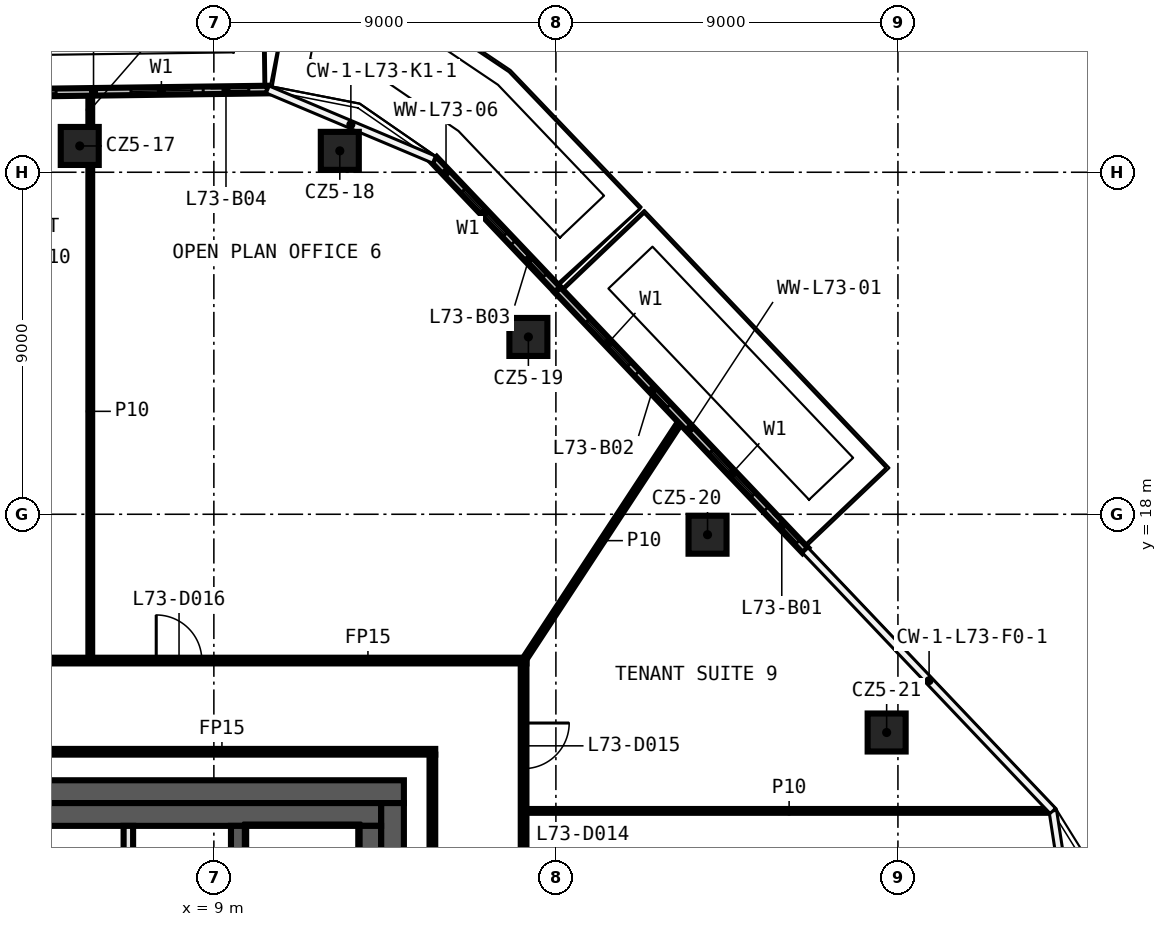
"""IFC4 building model, lengths in metres.
Left out: names, types, materials, properties, quantities, classifications, styles, units other than length and angle.
Written with IfcOpenShell. Run it as: python <this file> out.ifc"""

import sys

from ifc_helpers import new_model, si_unit, direction, frame, frame_2d, origin, origin_2d, place, context, subcontext, project, spatial, rectangle, extrude, element, fill, save


model = new_model("IFC4")
c1 = context("Model", 3, precision=1e-05, world=origin(), true_north=direction((0.0, 1.0)))
c2 = subcontext(c1, "Body", "Model", "MODEL_VIEW")
j1 = project(units=[si_unit("LENGTHUNIT", "METRE"), si_unit("PLANEANGLEUNIT", "RADIAN")], contexts=[c1])
p1 = place(None, origin())
s1 = spatial("IfcSite", under=j1, at=p1, CompositionType="ELEMENT")
p2 = place(p1, origin())
s2 = spatial("IfcBuilding", under=s1, at=p2, CompositionType="ELEMENT")
p3 = place(p2, frame((0.0, 0.0, 340.4)))
s3 = spatial("IfcBuildingStorey", under=s2, at=p3, CompositionType="ELEMENT", Elevation=340.4)
for number, where, z_axis, x_axis in (
    (1, (5.471, 27.692, 0.0), (0.0, 0.0, 1.0), (1.0, 0.0, 0.0)),
    (2, (12.314, 27.563, 0.0), (0.0, 0.0, 1.0), (1.0, 0.0, 0.0)),
    (3, (17.276, 22.666, 0.0), (0.0, 0.0, 1.0), (1.0, 0.0, 0.0)),
    (4, (21.99, 17.462, 0.0), (0.0, 0.0, 1.0), (1.0, 0.0, 0.0)),
    (5, (26.703, 12.257, 0.0), (0.0, 0.0, 1.0), (1.0, 0.0, 0.0)),
):
    element("IfcColumn", number, at=place(p3, frame(where, z_axis=z_axis, x_axis=x_axis)), inside=s3, PredefinedType="COLUMN", context=c2, shape_type="SweptSolid", body=[
        extrude(rectangle(XDim=1.0, YDim=1.0, at=origin_2d()), origin(), (0.0, 0.0, 1.0), 3.82),
    ])
p4 = place(p3, frame((17.225, 10.194, 0.0), z_axis=(0.0, 0.0, 1.0), x_axis=(1.0, 0.0, 0.0)))
e6 = element("IfcWall", 6, at=p4, inside=s3, PredefinedType="PARTITIONING", context=c2, shape_type="SweptSolid", body=[
    extrude(rectangle(XDim=13.823, YDim=0.1, at=frame_2d((6.912, 0.0))), origin(), (0.0, 0.0, 1.0), 3.82),
])
p5 = place(p3, frame((3.6, 11.75, 0.0), z_axis=(0.0, 0.0, 1.0), x_axis=(1.0, 0.0, 0.0)))
e7 = element("IfcWall", 7, at=p5, inside=s3, PredefinedType="PARTITIONING", context=c2, shape_type="SweptSolid", body=[
    extrude(rectangle(XDim=11.225, YDim=0.15, at=frame_2d((5.612, 0.0))), origin(), (0.0, 0.0, 1.0), 3.82),
])
p6 = place(p3, frame((-17.225, 14.15, 0.0), z_axis=(0.0, 0.0, 1.0), x_axis=(1.0, 0.0, 0.0)))
e8 = element("IfcWall", 8, at=p6, inside=s3, PredefinedType="PARTITIONING", context=c2, shape_type="SweptSolid", body=[
    extrude(rectangle(XDim=34.45, YDim=0.15, at=frame_2d((17.225, 0.0))), origin(), (0.0, 0.0, 1.0), 3.82),
])
p7 = place(p6, frame((24.708, 0.0, 0.0)))
e9 = element("IfcOpeningElement", 9, at=p7, cuts=e8, PredefinedType="OPENING", context=c2, shape_type="SweptSolid", body=[
    extrude(rectangle(XDim=1.2, YDim=2.1, at=frame_2d((0.6, 1.05))), frame((0.0, 0.085, 0.0), z_axis=(0.0, -1.0, 0.0), x_axis=(1.0, 0.0, 0.0)), (0.0, 0.0, 1.0), 0.17),
])
p8 = place(p6, frame((20.038, 0.0, 0.0)))
e10 = element("IfcOpeningElement", 10, at=p8, cuts=e8, PredefinedType="OPENING", context=c2, shape_type="SweptSolid", body=[
    extrude(rectangle(XDim=1.2, YDim=2.1, at=frame_2d((0.6, 1.05))), frame((0.0, 0.085, 0.0), z_axis=(0.0, -1.0, 0.0), x_axis=(1.0, 0.0, 0.0)), (0.0, 0.0, 1.0), 0.17),
])
p9 = place(p6, frame((15.367, 0.0, 0.0)))
e11 = element("IfcOpeningElement", 11, at=p9, cuts=e8, PredefinedType="OPENING", context=c2, shape_type="SweptSolid", body=[
    extrude(rectangle(XDim=1.2, YDim=2.1, at=frame_2d((0.6, 1.05))), frame((0.0, 0.085, 0.0), z_axis=(0.0, -1.0, 0.0), x_axis=(1.0, 0.0, 0.0)), (0.0, 0.0, 1.0), 0.17),
])
p10 = place(p6, frame((10.695, 0.0, 0.0)))
e12 = element("IfcOpeningElement", 12, at=p10, cuts=e8, PredefinedType="OPENING", context=c2, shape_type="SweptSolid", body=[
    extrude(rectangle(XDim=1.2, YDim=2.1, at=frame_2d((0.6, 1.05))), frame((0.0, 0.085, 0.0), z_axis=(0.0, -1.0, 0.0), x_axis=(1.0, 0.0, 0.0)), (0.0, 0.0, 1.0), 0.17),
])
p11 = place(p6, frame((6.025, 0.0, 0.0)))
e13 = element("IfcOpeningElement", 13, at=p11, cuts=e8, PredefinedType="OPENING", context=c2, shape_type="SweptSolid", body=[
    extrude(rectangle(XDim=1.2, YDim=2.1, at=frame_2d((0.6, 1.05))), frame((0.0, 0.085, 0.0), z_axis=(0.0, -1.0, 0.0), x_axis=(1.0, 0.0, 0.0)), (0.0, 0.0, 1.0), 0.17),
])
p12 = place(p6, frame((1.698, 0.0, 0.0)))
e14 = element("IfcOpeningElement", 14, at=p12, cuts=e8, PredefinedType="OPENING", context=c2, shape_type="SweptSolid", body=[
    extrude(rectangle(XDim=1.2, YDim=2.1, at=frame_2d((0.6, 1.05))), frame((0.0, 0.085, 0.0), z_axis=(0.0, -1.0, 0.0), x_axis=(1.0, 0.0, 0.0)), (0.0, 0.0, 1.0), 0.17),
])
p13 = place(p3, frame((17.15, 14.15, 0.0), z_axis=(0.0, 0.0, 1.0), x_axis=(0.548731307267, 0.835998775373, 0.0)))
e15 = element("IfcWall", 15, at=p13, inside=s3, PredefinedType="PARTITIONING", context=c2, shape_type="SweptSolid", body=[
    extrude(rectangle(XDim=7.55, YDim=0.1, at=frame_2d((3.775, 0.0))), origin(), (0.0, 0.0, 1.0), 3.82),
])
p14 = place(p3, frame((17.15, 14.075, 0.0), z_axis=(0.0, 0.0, 1.0), x_axis=(0.0, -1.0, 0.0)))
e16 = element("IfcWall", 16, at=p14, inside=s3, PredefinedType="PARTITIONING", context=c2, shape_type="SweptSolid", body=[
    extrude(rectangle(XDim=28.15, YDim=0.15, at=frame_2d((14.075, 0.0))), origin(), (0.0, 0.0, 1.0), 3.82),
])
p15 = place(p14, frame((24.339, 0.0, 0.0)))
e17 = element("IfcOpeningElement", 17, at=p15, cuts=e16, PredefinedType="OPENING", context=c2, shape_type="SweptSolid", body=[
    extrude(rectangle(XDim=1.2, YDim=2.1, at=frame_2d((0.6, 1.05))), frame((0.0, 0.085, 0.0), z_axis=(0.0, -1.0, 0.0), x_axis=(1.0, 0.0, 0.0)), (0.0, 0.0, 1.0), 0.17),
])
p16 = place(p14, frame((20.227, 0.0, 0.0)))
e18 = element("IfcOpeningElement", 18, at=p16, cuts=e16, PredefinedType="OPENING", context=c2, shape_type="SweptSolid", body=[
    extrude(rectangle(XDim=1.2, YDim=2.1, at=frame_2d((0.6, 1.05))), frame((0.0, 0.085, 0.0), z_axis=(0.0, -1.0, 0.0), x_axis=(1.0, 0.0, 0.0)), (0.0, 0.0, 1.0), 0.17),
])
p17 = place(p14, frame((16.115, 0.0, 0.0)))
e19 = element("IfcOpeningElement", 19, at=p17, cuts=e16, PredefinedType="OPENING", context=c2, shape_type="SweptSolid", body=[
    extrude(rectangle(XDim=1.2, YDim=2.1, at=frame_2d((0.6, 1.05))), frame((0.0, 0.085, 0.0), z_axis=(0.0, -1.0, 0.0), x_axis=(1.0, 0.0, 0.0)), (0.0, 0.0, 1.0), 0.17),
])
p18 = place(p14, frame((12.006, 0.0, 0.0)))
e20 = element("IfcOpeningElement", 20, at=p18, cuts=e16, PredefinedType="OPENING", context=c2, shape_type="SweptSolid", body=[
    extrude(rectangle(XDim=1.2, YDim=2.1, at=frame_2d((0.6, 1.05))), frame((0.0, 0.085, 0.0), z_axis=(0.0, -1.0, 0.0), x_axis=(1.0, 0.0, 0.0)), (0.0, 0.0, 1.0), 0.17),
])
p19 = place(p14, frame((5.464, 0.0, 0.0)))
e21 = element("IfcOpeningElement", 21, at=p19, cuts=e16, PredefinedType="OPENING", context=c2, shape_type="SweptSolid", body=[
    extrude(rectangle(XDim=1.2, YDim=2.1, at=frame_2d((0.6, 1.05))), frame((0.0, 0.085, 0.0), z_axis=(0.0, -1.0, 0.0), x_axis=(1.0, 0.0, 0.0)), (0.0, 0.0, 1.0), 0.17),
])
p20 = place(p14, frame((1.569, 0.0, 0.0)))
e22 = element("IfcOpeningElement", 22, at=p20, cuts=e16, PredefinedType="OPENING", context=c2, shape_type="SweptSolid", body=[
    extrude(rectangle(XDim=1.2, YDim=2.1, at=frame_2d((0.6, 1.05))), frame((0.0, 0.085, 0.0), z_axis=(0.0, -1.0, 0.0), x_axis=(1.0, 0.0, 0.0)), (0.0, 0.0, 1.0), 0.17),
])
p21 = place(p3, frame((14.75, -11.675, 0.0), z_axis=(0.0, 0.0, 1.0), x_axis=(0.0, 1.0, 0.0)))
e23 = element("IfcWall", 23, at=p21, inside=s3, PredefinedType="PARTITIONING", context=c2, shape_type="SweptSolid", body=[
    extrude(rectangle(XDim=23.35, YDim=0.15, at=frame_2d((11.675, 0.0))), origin(), (0.0, 0.0, 1.0), 3.82),
])
p22 = place(p3, frame((5.748, 14.225, 0.0), z_axis=(0.0, 0.0, 1.0), x_axis=(0.0, 1.0, 0.0)))
e24 = element("IfcWall", 24, at=p22, inside=s3, PredefinedType="PARTITIONING", context=c2, shape_type="SweptSolid", body=[
    extrude(rectangle(XDim=12.967, YDim=0.1, at=frame_2d((6.483, 0.0))), origin(), (0.0, 0.0, 1.0), 3.82),
])
p23 = place(p3, frame((5.748, 28.192, 0.0), z_axis=(0.0, 0.0, 1.0), x_axis=(0.0, 1.0, 0.0)))
e25 = element("IfcWall", 25, at=p23, inside=s3, PredefinedType="PARTITIONING", context=c2, shape_type="SweptSolid", body=[
    extrude(rectangle(XDim=0.903, YDim=0.1, at=frame_2d((0.452, 0.0))), origin(), (0.0, 0.0, 1.0), 3.82),
])
p24 = place(p3, frame((24.563, 17.049, 0.0), z_axis=(0.0, 0.0, 1.0), x_axis=(-0.688807081371, 0.724944690755, 0.0)))
e26 = element("IfcWall", 26, at=p24, inside=s3, PredefinedType="SOLIDWALL", context=c2, shape_type="SweptSolid", body=[
    extrude(rectangle(XDim=9.465, YDim=0.2, at=frame_2d((4.732, 0.0))), origin(), (0.0, 0.0, 1.0), 3.82),
])
p25 = place(p24, frame((2.0, 0.0, 0.6)))
e27 = element("IfcOpeningElement", 27, at=p25, cuts=e26, PredefinedType="OPENING", context=c2, shape_type="SweptSolid", body=[
    extrude(rectangle(XDim=1.6, YDim=2.4, at=frame_2d((0.8, 1.2))), frame((0.0, 0.11, 0.0), z_axis=(0.0, -1.0, 0.0), x_axis=(1.0, 0.0, 0.0)), (0.0, 0.0, 1.0), 0.22),
])
p26 = place(p24, frame((0.3, 0.0, 0.0)))
e28 = element("IfcOpeningElement", 28, at=p26, cuts=e26, PredefinedType="OPENING", context=c2, shape_type="SweptSolid", body=[
    extrude(rectangle(XDim=1.2, YDim=2.4, at=frame_2d((0.6, 1.2))), frame((0.0, 0.11, 0.0), z_axis=(0.0, -1.0, 0.0), x_axis=(1.0, 0.0, 0.0)), (0.0, 0.0, 1.0), 0.22),
])
p27 = place(p24, frame((6.733, 0.0, 0.6)))
e29 = element("IfcOpeningElement", 29, at=p27, cuts=e26, PredefinedType="OPENING", context=c2, shape_type="SweptSolid", body=[
    extrude(rectangle(XDim=1.6, YDim=2.4, at=frame_2d((0.8, 1.2))), frame((0.0, 0.11, 0.0), z_axis=(0.0, -1.0, 0.0), x_axis=(1.0, 0.0, 0.0)), (0.0, 0.0, 1.0), 0.22),
])
p28 = place(p24, frame((5.233, 0.0, 0.0)))
e30 = element("IfcOpeningElement", 30, at=p28, cuts=e26, PredefinedType="OPENING", context=c2, shape_type="SweptSolid", body=[
    extrude(rectangle(XDim=1.2, YDim=2.4, at=frame_2d((0.6, 1.2))), frame((0.0, 0.11, 0.0), z_axis=(0.0, -1.0, 0.0), x_axis=(1.0, 0.0, 0.0)), (0.0, 0.0, 1.0), 0.22),
])
p29 = place(p3, frame((18.044, 23.91, 0.0), z_axis=(0.0, 0.0, 1.0), x_axis=(-0.688806527413, 0.724945217098, 0.0)))
e31 = element("IfcWall", 31, at=p29, inside=s3, PredefinedType="SOLIDWALL", context=c2, shape_type="SweptSolid", body=[
    extrude(rectangle(XDim=4.722, YDim=0.2, at=frame_2d((2.361, 0.0))), origin(), (0.0, 0.0, 1.0), 3.82),
])
p30 = place(p29, frame((2.0, 0.0, 0.6)))
e32 = element("IfcOpeningElement", 32, at=p30, cuts=e31, PredefinedType="OPENING", context=c2, shape_type="SweptSolid", body=[
    extrude(rectangle(XDim=1.6, YDim=2.4, at=frame_2d((0.8, 1.2))), frame((0.0, 0.11, 0.0), z_axis=(0.0, -1.0, 0.0), x_axis=(1.0, 0.0, 0.0)), (0.0, 0.0, 1.0), 0.22),
])
p31 = place(p29, frame((0.5, 0.0, 0.0)))
e33 = element("IfcOpeningElement", 33, at=p31, cuts=e31, PredefinedType="OPENING", context=c2, shape_type="SweptSolid", body=[
    extrude(rectangle(XDim=1.2, YDim=2.4, at=frame_2d((0.6, 1.2))), frame((0.0, 0.11, 0.0), z_axis=(0.0, -1.0, 0.0), x_axis=(1.0, 0.0, 0.0)), (0.0, 0.0, 1.0), 0.22),
])
p32 = place(p3, frame((10.419, 29.177, 0.0), z_axis=(0.0, 0.0, 1.0), x_axis=(-0.999913262087, -0.013170736582, 0.0)))
e34 = element("IfcWall", 34, at=p32, inside=s3, PredefinedType="SOLIDWALL", context=c2, shape_type="SweptSolid", body=[
    extrude(rectangle(XDim=14.014, YDim=0.2, at=frame_2d((7.007, 0.0))), origin(), (0.0, 0.0, 1.0), 3.82),
])
p33 = place(p32, frame((2.0, 0.0, 0.6)))
e35 = element("IfcOpeningElement", 35, at=p33, cuts=e34, PredefinedType="OPENING", context=c2, shape_type="SweptSolid", body=[
    extrude(rectangle(XDim=1.6, YDim=2.4, at=frame_2d((0.8, 1.2))), frame((0.0, 0.11, 0.0), z_axis=(0.0, -1.0, 0.0), x_axis=(1.0, 0.0, 0.0)), (0.0, 0.0, 1.0), 0.22),
])
p34 = place(p32, frame((0.5, 0.0, 0.0)))
e36 = element("IfcOpeningElement", 36, at=p34, cuts=e34, PredefinedType="OPENING", context=c2, shape_type="SweptSolid", body=[
    extrude(rectangle(XDim=1.2, YDim=2.4, at=frame_2d((0.6, 1.2))), frame((0.0, 0.11, 0.0), z_axis=(0.0, -1.0, 0.0), x_axis=(1.0, 0.0, 0.0)), (0.0, 0.0, 1.0), 0.22),
])
p35 = place(p32, frame((7.071, 0.0, 0.6)))
e37 = element("IfcOpeningElement", 37, at=p35, cuts=e34, PredefinedType="OPENING", context=c2, shape_type="SweptSolid", body=[
    extrude(rectangle(XDim=1.6, YDim=2.4, at=frame_2d((0.8, 1.2))), frame((0.0, 0.11, 0.0), z_axis=(0.0, -1.0, 0.0), x_axis=(1.0, 0.0, 0.0)), (0.0, 0.0, 1.0), 0.22),
])
p36 = place(p32, frame((5.571, 0.0, 0.0)))
e38 = element("IfcOpeningElement", 38, at=p36, cuts=e34, PredefinedType="OPENING", context=c2, shape_type="SweptSolid", body=[
    extrude(rectangle(XDim=1.2, YDim=2.4, at=frame_2d((0.6, 1.2))), frame((0.0, 0.11, 0.0), z_axis=(0.0, -1.0, 0.0), x_axis=(1.0, 0.0, 0.0)), (0.0, 0.0, 1.0), 0.22),
])
p37 = place(p32, frame((11.342, 0.0, 0.6)))
e39 = element("IfcOpeningElement", 39, at=p37, cuts=e34, PredefinedType="OPENING", context=c2, shape_type="SweptSolid", body=[
    extrude(rectangle(XDim=1.6, YDim=2.4, at=frame_2d((0.8, 1.2))), frame((0.0, 0.11, 0.0), z_axis=(0.0, -1.0, 0.0), x_axis=(1.0, 0.0, 0.0)), (0.0, 0.0, 1.0), 0.22),
])
p38 = place(p32, frame((9.842, 0.0, 0.0)))
e40 = element("IfcOpeningElement", 40, at=p38, cuts=e34, PredefinedType="OPENING", context=c2, shape_type="SweptSolid", body=[
    extrude(rectangle(XDim=1.2, YDim=2.4, at=frame_2d((0.6, 1.2))), frame((0.0, 0.11, 0.0), z_axis=(0.0, -1.0, 0.0), x_axis=(1.0, 0.0, 0.0)), (0.0, 0.0, 1.0), 0.22),
])
p39 = place(p3, frame((-14.0, 10.7, 0.0), z_axis=(0.0, 0.0, 1.0), x_axis=(1.0, 0.0, 0.0)))
e41 = element("IfcWall", 41, at=p39, inside=s3, PredefinedType="SHEAR", context=c2, shape_type="SweptSolid", body=[
    extrude(rectangle(XDim=28.0, YDim=0.6, at=frame_2d((14.0, 0.0))), origin(), (0.0, 0.0, 1.0), 3.82),
])
p40 = place(p39, frame((15.9, 0.0, 0.0)))
e42 = element("IfcOpeningElement", 42, at=p40, cuts=e41, PredefinedType="OPENING", context=c2, shape_type="SweptSolid", body=[
    extrude(rectangle(XDim=1.6, YDim=2.1, at=frame_2d((0.8, 1.05))), frame((0.0, 0.31, 0.0), z_axis=(0.0, -1.0, 0.0), x_axis=(1.0, 0.0, 0.0)), (0.0, 0.0, 1.0), 0.62),
])
p41 = place(p3, frame((13.7, 10.4, 0.0), z_axis=(0.0, 0.0, 1.0), x_axis=(0.0, -1.0, 0.0)))
e43 = element("IfcWall", 43, at=p41, inside=s3, PredefinedType="SHEAR", context=c2, shape_type="SweptSolid", body=[
    extrude(rectangle(XDim=20.8, YDim=0.6, at=frame_2d((10.4, 0.0))), origin(), (0.0, 0.0, 1.0), 3.82),
])
p42 = place(p3, frame((3.9, 10.1, 0.0), z_axis=(0.0, 0.0, 1.0), x_axis=(1.0, 0.0, 0.0)))
e44 = element("IfcWall", 44, at=p42, inside=s3, PredefinedType="SHEAR", context=c2, shape_type="SweptSolid", body=[
    extrude(rectangle(XDim=9.5, YDim=0.6, at=frame_2d((4.75, 0.0))), origin(), (0.0, 0.0, 1.0), 3.82),
])
p43 = place(p3, frame((13.1, 9.8, 0.0), z_axis=(0.0, 0.0, 1.0), x_axis=(0.0, -1.0, 0.0)))
e45 = element("IfcWall", 45, at=p43, inside=s3, PredefinedType="SHEAR", context=c2, shape_type="SweptSolid", body=[
    extrude(rectangle(XDim=19.6, YDim=0.6, at=frame_2d((9.8, 0.0))), origin(), (0.0, 0.0, 1.0), 3.82),
])
p44 = place(p3, frame((9.65, 9.8, 0.0), z_axis=(0.0, 0.0, 1.0), x_axis=(0.0, -1.0, 0.0)))
e46 = element("IfcWall", 46, at=p44, inside=s3, PredefinedType="SHEAR", context=c2, shape_type="SweptSolid", body=[
    extrude(rectangle(XDim=7.5, YDim=0.4, at=frame_2d((3.75, 0.0))), origin(), (0.0, 0.0, 1.0), 3.82),
])
p45 = place(p44, frame((5.1, 0.0, 0.0)))
e47 = element("IfcOpeningElement", 47, at=p45, cuts=e46, PredefinedType="OPENING", context=c2, shape_type="SweptSolid", body=[
    extrude(rectangle(XDim=1.2, YDim=2.1, at=frame_2d((0.6, 1.05))), frame((0.0, 0.21, 0.0), z_axis=(0.0, -1.0, 0.0), x_axis=(1.0, 0.0, 0.0)), (0.0, 0.0, 1.0), 0.42),
])
p46 = place(p3, frame((6.75, 7.075, 0.0), z_axis=(0.0, 0.0, 1.0), x_axis=(0.0, 1.0, 0.0)))
e48 = element("IfcWall", 48, at=p46, inside=s3, PredefinedType="SOLIDWALL", context=c2, shape_type="SweptSolid", body=[
    extrude(rectangle(XDim=2.725, YDim=0.25, at=frame_2d((1.363, 0.0))), origin(), (0.0, 0.0, 1.0), 3.82),
])
p47 = place(p20, origin())
e49 = element("IfcDoor", 49, at=p47, inside=s3, OperationType="SINGLE_SWING_RIGHT", PredefinedType="DOOR", context=c2, shape_type="SweptSolid", body=[
    extrude(rectangle(XDim=1.2, YDim=2.1, at=frame_2d((0.6, 1.05))), frame((0.0, 0.025, 0.0), z_axis=(0.0, -1.0, 0.0), x_axis=(1.0, 0.0, 0.0)), (0.0, 0.0, 1.0), 0.05),
])
fill(e22, e49)
p48 = place(p7, origin())
e50 = element("IfcDoor", 50, at=p48, inside=s3, OperationType="SINGLE_SWING_LEFT", PredefinedType="DOOR", context=c2, shape_type="SweptSolid", body=[
    extrude(rectangle(XDim=1.2, YDim=2.1, at=frame_2d((0.6, 1.05))), frame((0.0, 0.025, 0.0), z_axis=(0.0, -1.0, 0.0), x_axis=(1.0, 0.0, 0.0)), (0.0, 0.0, 1.0), 0.05),
])
fill(e9, e50)
p49 = place(p25, origin())
e51 = element("IfcWindow", 51, at=p49, inside=s3, PartitioningType="SINGLE_PANEL", PredefinedType="WINDOW", context=c2, shape_type="SweptSolid", body=[
    extrude(rectangle(XDim=1.6, YDim=2.4, at=frame_2d((0.8, 1.2))), frame((0.0, 0.03, 0.0), z_axis=(0.0, -1.0, 0.0), x_axis=(1.0, 0.0, 0.0)), (0.0, 0.0, 1.0), 0.06),
])
fill(e27, e51)
p50 = place(p26, origin())
e52 = element("IfcDoor", 52, at=p50, inside=s3, OperationType="SLIDING_TO_LEFT", PredefinedType="DOOR", context=c2, shape_type="SweptSolid", body=[
    extrude(rectangle(XDim=1.2, YDim=2.4, at=frame_2d((0.6, 1.2))), frame((0.0, 0.025, 0.0), z_axis=(0.0, -1.0, 0.0), x_axis=(1.0, 0.0, 0.0)), (0.0, 0.0, 1.0), 0.05),
])
fill(e28, e52)
p51 = place(p27, origin())
e53 = element("IfcWindow", 53, at=p51, inside=s3, PartitioningType="SINGLE_PANEL", PredefinedType="WINDOW", context=c2, shape_type="SweptSolid", body=[
    extrude(rectangle(XDim=1.6, YDim=2.4, at=frame_2d((0.8, 1.2))), frame((0.0, 0.03, 0.0), z_axis=(0.0, -1.0, 0.0), x_axis=(1.0, 0.0, 0.0)), (0.0, 0.0, 1.0), 0.06),
])
fill(e29, e53)
p52 = place(p28, origin())
e54 = element("IfcDoor", 54, at=p52, inside=s3, OperationType="SLIDING_TO_LEFT", PredefinedType="DOOR", context=c2, shape_type="SweptSolid", body=[
    extrude(rectangle(XDim=1.2, YDim=2.4, at=frame_2d((0.6, 1.2))), frame((0.0, 0.025, 0.0), z_axis=(0.0, -1.0, 0.0), x_axis=(1.0, 0.0, 0.0)), (0.0, 0.0, 1.0), 0.05),
])
fill(e30, e54)
p53 = place(p30, origin())
e55 = element("IfcWindow", 55, at=p53, inside=s3, PartitioningType="SINGLE_PANEL", PredefinedType="WINDOW", context=c2, shape_type="SweptSolid", body=[
    extrude(rectangle(XDim=1.6, YDim=2.4, at=frame_2d((0.8, 1.2))), frame((0.0, 0.03, 0.0), z_axis=(0.0, -1.0, 0.0), x_axis=(1.0, 0.0, 0.0)), (0.0, 0.0, 1.0), 0.06),
])
fill(e32, e55)
p54 = place(p31, origin())
e56 = element("IfcDoor", 56, at=p54, inside=s3, OperationType="SLIDING_TO_LEFT", PredefinedType="DOOR", context=c2, shape_type="SweptSolid", body=[
    extrude(rectangle(XDim=1.2, YDim=2.4, at=frame_2d((0.6, 1.2))), frame((0.0, 0.025, 0.0), z_axis=(0.0, -1.0, 0.0), x_axis=(1.0, 0.0, 0.0)), (0.0, 0.0, 1.0), 0.05),
])
fill(e33, e56)
p55 = place(p33, origin())
e57 = element("IfcWindow", 57, at=p55, inside=s3, PartitioningType="SINGLE_PANEL", PredefinedType="WINDOW", context=c2, shape_type="SweptSolid", body=[
    extrude(rectangle(XDim=1.6, YDim=2.4, at=frame_2d((0.8, 1.2))), frame((0.0, 0.03, 0.0), z_axis=(0.0, -1.0, 0.0), x_axis=(1.0, 0.0, 0.0)), (0.0, 0.0, 1.0), 0.06),
])
fill(e35, e57)
p56 = place(p34, origin())
e58 = element("IfcDoor", 58, at=p56, inside=s3, OperationType="SLIDING_TO_LEFT", PredefinedType="DOOR", context=c2, shape_type="SweptSolid", body=[
    extrude(rectangle(XDim=1.2, YDim=2.4, at=frame_2d((0.6, 1.2))), frame((0.0, 0.025, 0.0), z_axis=(0.0, -1.0, 0.0), x_axis=(1.0, 0.0, 0.0)), (0.0, 0.0, 1.0), 0.05),
])
fill(e36, e58)
p57 = place(p36, origin())
e59 = element("IfcDoor", 59, at=p57, inside=s3, OperationType="SLIDING_TO_LEFT", PredefinedType="DOOR", context=c2, shape_type="SweptSolid", body=[
    extrude(rectangle(XDim=1.2, YDim=2.4, at=frame_2d((0.6, 1.2))), frame((0.0, 0.025, 0.0), z_axis=(0.0, -1.0, 0.0), x_axis=(1.0, 0.0, 0.0)), (0.0, 0.0, 1.0), 0.05),
])
fill(e38, e59)
save(model, sys.argv[1])
